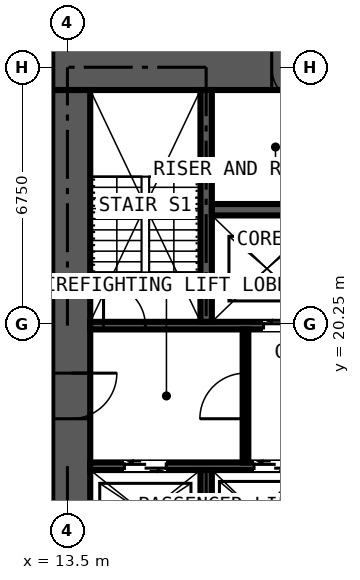
"""IFC4 building model, lengths in metres.
Left out: names, types, materials, properties, quantities, classifications, styles, units other than length and angle.
Written with IfcOpenShell. Run it as: python <this file> out.ifc"""

import sys

from ifc_helpers import new_model, si_unit, direction, frame, frame_2d, origin, place, context, subcontext, project, spatial, rectangle, extrude, element, fill, save


model = new_model("IFC4")
c1 = context("Model", 3, precision=1e-05, world=origin(), true_north=direction((0.0, 1.0)))
c2 = subcontext(c1, "Body", "Model", "MODEL_VIEW")
j1 = project(units=[si_unit("LENGTHUNIT", "METRE"), si_unit("PLANEANGLEUNIT", "RADIAN")], contexts=[c1])
p1 = place(None, origin())
s1 = spatial("IfcSite", under=j1, at=p1, CompositionType="ELEMENT")
p2 = place(p1, origin())
s2 = spatial("IfcBuilding", under=s1, at=p2, CompositionType="ELEMENT")
p3 = place(p2, frame((0.0, 0.0, 189.0)))
s3 = spatial("IfcBuildingStorey", under=s2, at=p3, CompositionType="ELEMENT", Elevation=189.0)
p4 = place(p3, frame((27.4, 27.0, 0.0), z_axis=(0.0, 0.0, 1.0), x_axis=(-1.0, 0.0, 0.0)))
e1 = element("IfcWall", 1, at=p4, inside=s3, PredefinedType="SHEAR", context=c2, shape_type="SweptSolid", body=[
    extrude(rectangle(XDim=14.3, YDim=1.2, at=frame_2d((7.15, 0.0))), origin(), (0.0, 0.0, 1.0), 3.6),
])
p5 = place(p4, frame((4.55, 0.0, 0.0)))
e2 = element("IfcOpeningElement", 2, at=p5, cuts=e1, PredefinedType="OPENING", context=c2, shape_type="SweptSolid", body=[
    extrude(rectangle(XDim=0.9, YDim=2.2, at=frame_2d((0.45, 1.1))), frame((0.0, 0.61, 0.0), z_axis=(0.0, -1.0, 0.0), x_axis=(1.0, 0.0, 0.0)), (0.0, 0.0, 1.0), 1.22),
])
p6 = place(p4, frame((7.525, 0.0, 0.0)))
e3 = element("IfcOpeningElement", 3, at=p6, cuts=e1, PredefinedType="OPENING", context=c2, shape_type="SweptSolid", body=[
    extrude(rectangle(XDim=1.0, YDim=2.2, at=frame_2d((0.5, 1.1))), frame((0.0, 0.61, 0.0), z_axis=(0.0, -1.0, 0.0), x_axis=(1.0, 0.0, 0.0)), (0.0, 0.0, 1.0), 1.22),
])
p7 = place(p3, frame((13.6, 26.4, 0.0), z_axis=(0.0, 0.0, 1.0), x_axis=(0.0, -1.0, 0.0)))
e4 = element("IfcWall", 4, at=p7, inside=s3, PredefinedType="SHEAR", context=c2, shape_type="SweptSolid", body=[
    extrude(rectangle(XDim=12.3, YDim=1.0, at=frame_2d((6.15, 0.0))), origin(), (0.0, 0.0, 1.0), 3.6),
])
p8 = place(p7, frame((7.45, 0.0, 0.0)))
e5 = element("IfcOpeningElement", 5, at=p8, cuts=e4, PredefinedType="OPENING", context=c2, shape_type="SweptSolid", body=[
    extrude(rectangle(XDim=1.2, YDim=2.2, at=frame_2d((0.6, 1.1))), frame((0.0, 0.51, 0.0), z_axis=(0.0, -1.0, 0.0), x_axis=(1.0, 0.0, 0.0)), (0.0, 0.0, 1.0), 1.02),
])
p9 = place(p3, frame((14.1, 16.5, 0.0), z_axis=(0.0, 0.0, 1.0), x_axis=(1.0, 0.0, 0.0)))
e6 = element("IfcWall", 6, at=p9, inside=s3, PredefinedType="SHEAR", context=c2, shape_type="SweptSolid", body=[
    extrude(rectangle(XDim=12.3, YDim=0.2, at=frame_2d((6.15, 0.0))), origin(), (0.0, 0.0, 1.0), 3.6),
])
p10 = place(p9, frame((0.9, 0.0, 0.0)))
e7 = element("IfcOpeningElement", 7, at=p10, cuts=e6, PredefinedType="OPENING", context=c2, shape_type="SweptSolid", body=[
    extrude(rectangle(XDim=1.1, YDim=2.2, at=frame_2d((0.55, 1.1))), frame((0.0, 0.11, 0.0), z_axis=(0.0, -1.0, 0.0), x_axis=(1.0, 0.0, 0.0)), (0.0, 0.0, 1.0), 0.22),
])
p11 = place(p9, frame((4.31, 0.0, 0.0)))
e8 = element("IfcOpeningElement", 8, at=p11, cuts=e6, PredefinedType="OPENING", context=c2, shape_type="SweptSolid", body=[
    extrude(rectangle(XDim=1.1, YDim=2.2, at=frame_2d((0.55, 1.1))), frame((0.0, 0.11, 0.0), z_axis=(0.0, -1.0, 0.0), x_axis=(1.0, 0.0, 0.0)), (0.0, 0.0, 1.0), 0.22),
])
p12 = place(p9, frame((6.45, 0.0, 0.0)))
e9 = element("IfcOpeningElement", 9, at=p12, cuts=e6, PredefinedType="OPENING", context=c2, shape_type="SweptSolid", body=[
    extrude(rectangle(XDim=1.1, YDim=2.2, at=frame_2d((0.55, 1.1))), frame((0.0, 0.11, 0.0), z_axis=(0.0, -1.0, 0.0), x_axis=(1.0, 0.0, 0.0)), (0.0, 0.0, 1.0), 0.22),
])
p13 = place(p9, frame((9.5, 0.0, 0.0)))
e10 = element("IfcOpeningElement", 10, at=p13, cuts=e6, PredefinedType="OPENING", context=c2, shape_type="SweptSolid", body=[
    extrude(rectangle(XDim=1.1, YDim=2.2, at=frame_2d((0.55, 1.1))), frame((0.0, 0.11, 0.0), z_axis=(0.0, -1.0, 0.0), x_axis=(1.0, 0.0, 0.0)), (0.0, 0.0, 1.0), 0.22),
])
p14 = place(p3, frame((14.1, 20.2, 0.0), z_axis=(0.0, 0.0, 1.0), x_axis=(1.0, 0.0, 0.0)))
e11 = element("IfcWall", 11, at=p14, inside=s3, PredefinedType="SHEAR", context=c2, shape_type="SweptSolid", body=[
    extrude(rectangle(XDim=12.3, YDim=0.2, at=frame_2d((6.15, 0.0))), origin(), (0.0, 0.0, 1.0), 3.6),
])
p15 = place(p14, frame((4.56, 0.0, 0.0)))
e12 = element("IfcOpeningElement", 12, at=p15, cuts=e11, PredefinedType="OPENING", context=c2, shape_type="SweptSolid", body=[
    extrude(rectangle(XDim=1.1, YDim=2.2, at=frame_2d((0.55, 1.1))), frame((0.0, 0.11, 0.0), z_axis=(0.0, -1.0, 0.0), x_axis=(1.0, 0.0, 0.0)), (0.0, 0.0, 1.0), 0.22),
])
p16 = place(p14, frame((6.7, 0.0, 0.0)))
e13 = element("IfcOpeningElement", 13, at=p16, cuts=e11, PredefinedType="OPENING", context=c2, shape_type="SweptSolid", body=[
    extrude(rectangle(XDim=1.1, YDim=2.2, at=frame_2d((0.55, 1.1))), frame((0.0, 0.11, 0.0), z_axis=(0.0, -1.0, 0.0), x_axis=(1.0, 0.0, 0.0)), (0.0, 0.0, 1.0), 0.22),
])
p17 = place(p14, frame((0.35, 0.0, 0.0)))
e14 = element("IfcOpeningElement", 14, at=p17, cuts=e11, PredefinedType="OPENING", context=c2, shape_type="SweptSolid", body=[
    extrude(rectangle(XDim=1.1, YDim=2.2, at=frame_2d((0.55, 1.1))), frame((0.0, 0.11, 0.0), z_axis=(0.0, -1.0, 0.0), x_axis=(1.0, 0.0, 0.0)), (0.0, 0.0, 1.0), 0.22),
])
p18 = place(p14, frame((9.75, 0.0, 0.0)))
e15 = element("IfcOpeningElement", 15, at=p18, cuts=e11, PredefinedType="OPENING", context=c2, shape_type="SweptSolid", body=[
    extrude(rectangle(XDim=1.1, YDim=2.2, at=frame_2d((0.55, 1.1))), frame((0.0, 0.11, 0.0), z_axis=(0.0, -1.0, 0.0), x_axis=(1.0, 0.0, 0.0)), (0.0, 0.0, 1.0), 0.22),
])
p19 = place(p3, frame((17.15, 20.3, 0.0), z_axis=(0.0, 0.0, 1.0), x_axis=(0.0, 1.0, 0.0)))
e16 = element("IfcWall", 16, at=p19, inside=s3, PredefinedType="SHEAR", context=c2, shape_type="SweptSolid", body=[
    extrude(rectangle(XDim=6.1, YDim=0.3, at=frame_2d((3.05, 0.0))), origin(), (0.0, 0.0, 1.0), 3.6),
])
p20 = place(p3, frame((17.3, 23.25, 0.0), z_axis=(0.0, 0.0, 1.0), x_axis=(1.0, 0.0, 0.0)))
e17 = element("IfcWall", 17, at=p20, inside=s3, PredefinedType="SHEAR", context=c2, shape_type="SweptSolid", body=[
    extrude(rectangle(XDim=5.9, YDim=0.3, at=frame_2d((2.95, 0.0))), origin(), (0.0, 0.0, 1.0), 3.6),
])
p21 = place(p3, frame((17.15, 14.1, 0.0), z_axis=(0.0, 0.0, 1.0), x_axis=(0.0, 1.0, 0.0)))
e18 = element("IfcWall", 18, at=p21, inside=s3, PredefinedType="SHEAR", context=c2, shape_type="SweptSolid", body=[
    extrude(rectangle(XDim=2.3, YDim=0.3, at=frame_2d((1.15, 0.0))), origin(), (0.0, 0.0, 1.0), 3.6),
])
p22 = place(p3, frame((18.185, 16.6, 0.0), z_axis=(0.0, 0.0, 1.0), x_axis=(0.0, 1.0, 0.0)))
e19 = element("IfcWall", 19, at=p22, inside=s3, PredefinedType="PARTITIONING", context=c2, shape_type="SweptSolid", body=[
    extrude(rectangle(XDim=3.5, YDim=0.15, at=frame_2d((1.75, 0.0))), origin(), (0.0, 0.0, 1.0), 3.375),
])
p23 = place(p22, frame((1.15, 0.0, 0.0)))
e20 = element("IfcOpeningElement", 20, at=p23, cuts=e19, PredefinedType="OPENING", context=c2, shape_type="SweptSolid", body=[
    extrude(rectangle(XDim=1.2, YDim=2.2, at=frame_2d((0.6, 1.1))), frame((0.0, 0.085, 0.0), z_axis=(0.0, -1.0, 0.0), x_axis=(1.0, 0.0, 0.0)), (0.0, 0.0, 1.0), 0.17),
])
p24 = place(p10, origin())
e21 = element("IfcDoor", 21, at=p24, inside=s3, OperationType="DOUBLE_DOOR_SLIDING", PredefinedType="DOOR", context=c2, shape_type="SweptSolid", body=[
    extrude(rectangle(XDim=1.1, YDim=2.2, at=frame_2d((0.55, 1.1))), frame((0.0, 0.025, 0.0), z_axis=(0.0, -1.0, 0.0), x_axis=(1.0, 0.0, 0.0)), (0.0, 0.0, 1.0), 0.05),
])
fill(e7, e21)
p25 = place(p11, origin())
e22 = element("IfcDoor", 22, at=p25, inside=s3, OperationType="DOUBLE_DOOR_SLIDING", PredefinedType="DOOR", context=c2, shape_type="SweptSolid", body=[
    extrude(rectangle(XDim=1.1, YDim=2.2, at=frame_2d((0.55, 1.1))), frame((0.0, 0.025, 0.0), z_axis=(0.0, -1.0, 0.0), x_axis=(1.0, 0.0, 0.0)), (0.0, 0.0, 1.0), 0.05),
])
fill(e8, e22)
p26 = place(p15, origin())
e23 = element("IfcDoor", 23, at=p26, inside=s3, OperationType="DOUBLE_DOOR_SLIDING", PredefinedType="DOOR", context=c2, shape_type="SweptSolid", body=[
    extrude(rectangle(XDim=1.1, YDim=2.2, at=frame_2d((0.55, 1.1))), frame((0.0, 0.025, 0.0), z_axis=(0.0, -1.0, 0.0), x_axis=(1.0, 0.0, 0.0)), (0.0, 0.0, 1.0), 0.05),
])
fill(e12, e23)
p27 = place(p8, origin())
e24 = element("IfcDoor", 24, at=p27, inside=s3, OperationType="DOUBLE_DOOR_SINGLE_SWING", PredefinedType="DOOR", context=c2, shape_type="SweptSolid", body=[
    extrude(rectangle(XDim=1.2, YDim=2.2, at=frame_2d((0.6, 1.1))), frame((0.0, 0.025, 0.0), z_axis=(0.0, -1.0, 0.0), x_axis=(1.0, 0.0, 0.0)), (0.0, 0.0, 1.0), 0.05),
])
fill(e5, e24)
p28 = place(p23, origin())
e25 = element("IfcDoor", 25, at=p28, inside=s3, OperationType="DOUBLE_DOOR_SINGLE_SWING", PredefinedType="DOOR", context=c2, shape_type="SweptSolid", body=[
    extrude(rectangle(XDim=1.2, YDim=2.2, at=frame_2d((0.6, 1.1))), frame((0.0, 0.025, 0.0), z_axis=(0.0, -1.0, 0.0), x_axis=(1.0, 0.0, 0.0)), (0.0, 0.0, 1.0), 0.05),
])
fill(e20, e25)
p29 = place(p6, origin())
e26 = element("IfcDoor", 26, at=p29, inside=s3, OperationType="SINGLE_SWING_LEFT", PredefinedType="DOOR", context=c2, shape_type="SweptSolid", body=[
    extrude(rectangle(XDim=1.0, YDim=2.2, at=frame_2d((0.5, 1.1))), frame((0.0, 0.025, 0.0), z_axis=(0.0, -1.0, 0.0), x_axis=(1.0, 0.0, 0.0)), (0.0, 0.0, 1.0), 0.05),
])
fill(e3, e26)
p30 = place(p17, origin())
e27 = element("IfcDoor", 27, at=p30, inside=s3, OperationType="SINGLE_SWING_LEFT", PredefinedType="DOOR", context=c2, shape_type="SweptSolid", body=[
    extrude(rectangle(XDim=1.1, YDim=2.2, at=frame_2d((0.55, 1.1))), frame((0.0, 0.025, 0.0), z_axis=(0.0, -1.0, 0.0), x_axis=(1.0, 0.0, 0.0)), (0.0, 0.0, 1.0), 0.05),
])
fill(e14, e27)
save(model, sys.argv[1])
